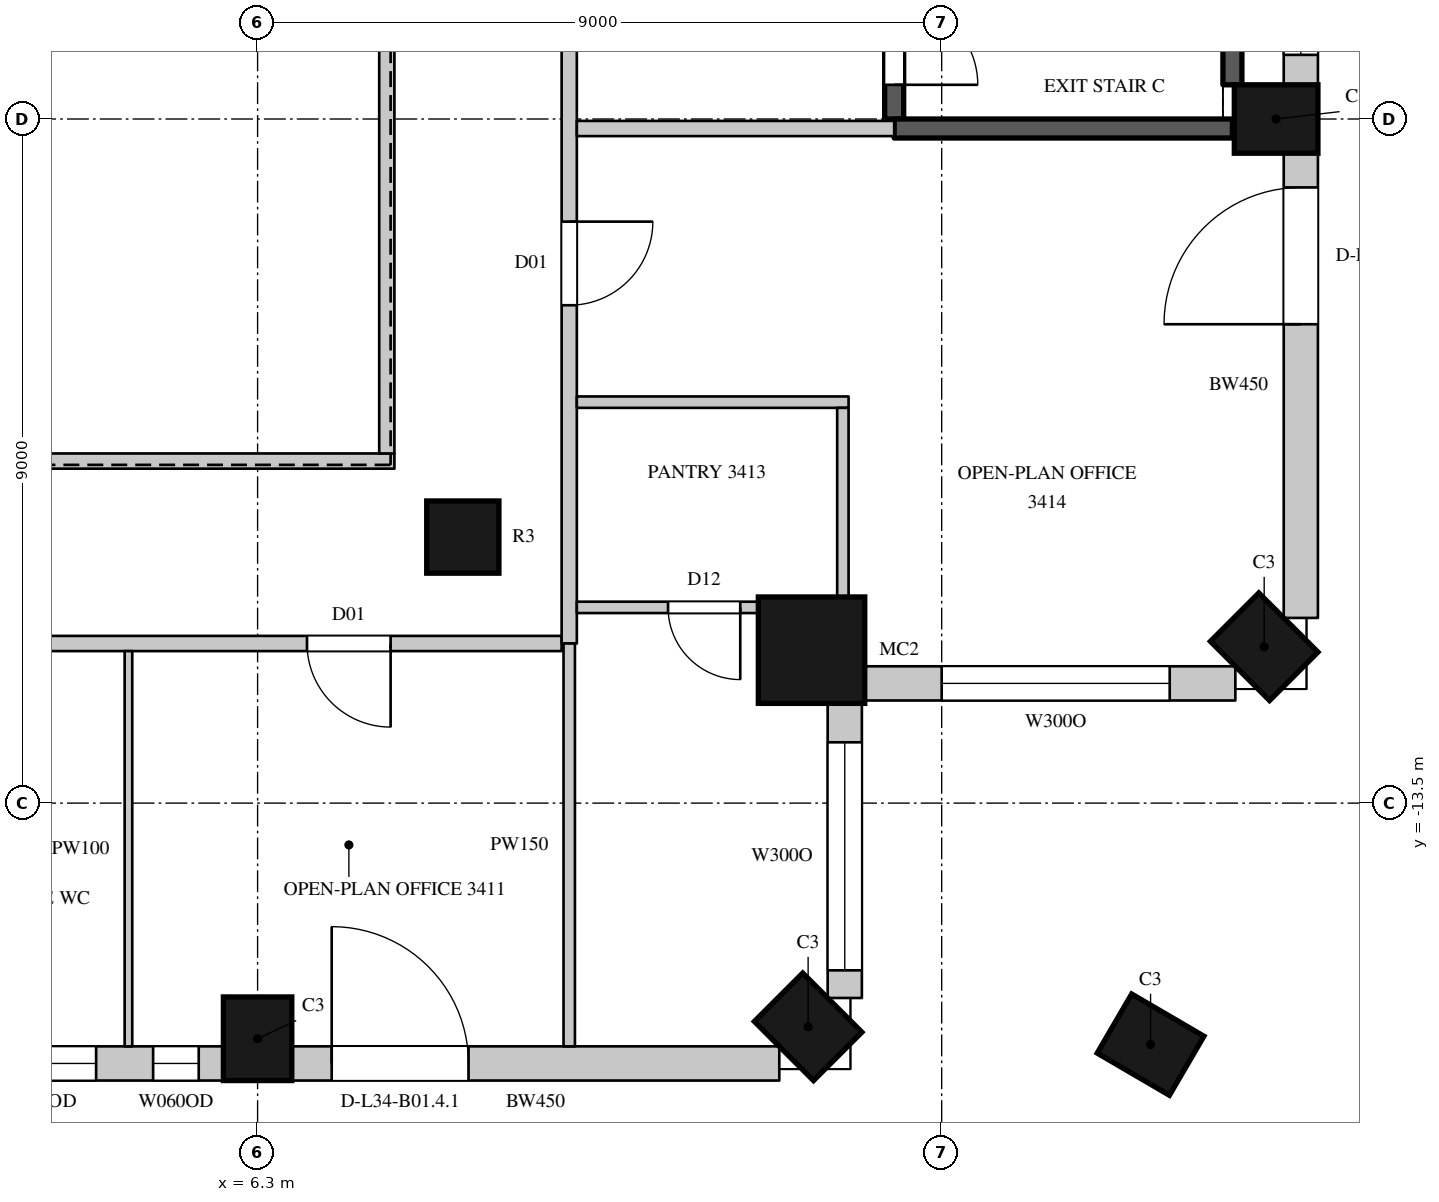
"""IFC4 building model, lengths in metres.
Left out: names, types, materials, properties, quantities, classifications, styles, units other than length and angle.
Written with IfcOpenShell. Run it as: python <this file> out.ifc"""

import sys

from ifc_helpers import new_model, si_unit, direction, frame, frame_2d, origin, origin_2d, place, context, subcontext, project, spatial, rectangle, circle, extrude, element, fill, save


model = new_model("IFC4")
c1 = context("Model", 3, precision=1e-05, world=origin(), true_north=direction((0.0, 1.0)))
c2 = subcontext(c1, "Body", "Model", "MODEL_VIEW")
j1 = project(units=[si_unit("LENGTHUNIT", "METRE"), si_unit("PLANEANGLEUNIT", "RADIAN")], contexts=[c1])
p1 = place(None, origin())
s1 = spatial("IfcSite", under=j1, at=p1, CompositionType="ELEMENT")
p2 = place(p1, origin())
s2 = spatial("IfcBuilding", under=s1, at=p2, CompositionType="ELEMENT")
p3 = place(p2, frame((0.0, 0.0, 160.5)))
s3 = spatial("IfcBuildingStorey", under=s2, at=p3, CompositionType="ELEMENT", Elevation=160.5)
for number, where, z_axis, x_axis in (
    (1, (6.3, -16.6, 0.0), (0.0, 0.0, 1.0), (1.0, 0.0, 0.0)),
    (2, (13.543, -16.443, 0.0), (0.0, 0.0, 1.0), (0.707, 0.707, 0.0)),
):
    element("IfcColumn", number, at=place(p3, frame(where, z_axis=z_axis, x_axis=x_axis)), inside=s3, PredefinedType="COLUMN", context=c2, shape_type="SweptSolid", body=[
        extrude(rectangle(XDim=0.9, YDim=1.1, at=origin_2d()), origin(), (0.0, 0.0, 1.0), 4.1),
    ])
p4 = place(p3, frame((13.588, -11.488, 0.0), z_axis=(0.0, 0.0, 1.0), x_axis=(1.0, 0.0, 0.0)))
e3 = element("IfcColumn", 3, at=p4, inside=s3, PredefinedType="COLUMN", context=c2, shape_type="SweptSolid", body=[
    extrude(circle(Radius=0.7, at=origin_2d()), origin(), (0.0, 0.0, 1.0), 4.1),
])
for number, where, z_axis, x_axis in (
    (4, (19.543, -11.443, 0.0), (0.0, 0.0, 1.0), (0.707, 0.707, 0.0)),
    (5, (19.7, -4.5, 0.0), (0.0, 0.0, 1.0), (0.0, 1.0, 0.0)),
    (6, (18.048, -16.677, 0.0), (0.0, 0.0, 1.0), (0.504, 0.863, 0.0)),
):
    element("IfcColumn", number, at=place(p3, frame(where, z_axis=z_axis, x_axis=x_axis)), inside=s3, PredefinedType="COLUMN", context=c2, shape_type="SweptSolid", body=[
        extrude(rectangle(XDim=0.9, YDim=1.1, at=origin_2d()), origin(), (0.0, 0.0, 1.0), 4.1),
    ])
p5 = place(p3, frame((9.0, -10.0, 0.0), z_axis=(0.0, 0.0, 1.0), x_axis=(1.0, 0.0, 0.0)))
e7 = element("IfcColumn", 7, at=p5, inside=s3, PredefinedType="COLUMN", context=c2, shape_type="SweptSolid", body=[
    extrude(circle(Radius=0.475, at=origin_2d()), origin(), (0.0, 0.0, 1.0), 4.1),
])
p6 = place(p3, frame((-2.25, -16.925, 0.0), z_axis=(0.0, 0.0, 1.0), x_axis=(1.0, 0.0, 0.0)))
e8 = element("IfcWall", 8, at=p6, inside=s3, PredefinedType="SOLIDWALL", context=c2, shape_type="SweptSolid", body=[
    extrude(rectangle(XDim=8.1, YDim=0.45, at=frame_2d((4.05, 0.0))), origin(), (0.0, 0.0, 1.0), 3.8),
])
p7 = place(p6, frame((0.2, 0.0, 0.0)))
e9 = element("IfcOpeningElement", 9, at=p7, cuts=e8, PredefinedType="OPENING", context=c2, shape_type="SweptSolid", body=[
    extrude(rectangle(XDim=1.8, YDim=2.4, at=frame_2d((0.9, 1.2))), frame((0.0, 0.235, 0.0), z_axis=(0.0, -1.0, 0.0), x_axis=(1.0, 0.0, 0.0)), (0.0, 0.0, 1.0), 0.47),
])
p8 = place(p6, frame((2.2, 0.0, 1.05)))
e10 = element("IfcOpeningElement", 10, at=p8, cuts=e8, PredefinedType="OPENING", context=c2, shape_type="SweptSolid", body=[
    extrude(rectangle(XDim=1.2, YDim=2.4, at=frame_2d((0.6, 1.2))), frame((0.0, 0.235, 0.0), z_axis=(0.0, -1.0, 0.0), x_axis=(1.0, 0.0, 0.0)), (0.0, 0.0, 1.0), 0.47),
])
p9 = place(p6, frame((4.926, 0.0, 1.05)))
e11 = element("IfcOpeningElement", 11, at=p9, cuts=e8, PredefinedType="OPENING", context=c2, shape_type="SweptSolid", body=[
    extrude(rectangle(XDim=1.5, YDim=2.4, at=frame_2d((0.75, 1.2))), frame((0.0, 0.235, 0.0), z_axis=(0.0, -1.0, 0.0), x_axis=(1.0, 0.0, 0.0)), (0.0, 0.0, 1.0), 0.47),
])
p10 = place(p6, frame((7.176, 0.0, 1.05)))
e12 = element("IfcOpeningElement", 12, at=p10, cuts=e8, PredefinedType="OPENING", context=c2, shape_type="SweptSolid", body=[
    extrude(rectangle(XDim=0.6, YDim=2.4, at=frame_2d((0.3, 1.2))), frame((0.0, 0.235, 0.0), z_axis=(0.0, -1.0, 0.0), x_axis=(1.0, 0.0, 0.0)), (0.0, 0.0, 1.0), 0.47),
])
p11 = place(p3, frame((6.75, -16.925, 0.0), z_axis=(0.0, 0.0, 1.0), x_axis=(1.0, 0.0, 0.0)))
e13 = element("IfcWall", 13, at=p11, inside=s3, PredefinedType="SOLIDWALL", context=c2, shape_type="SweptSolid", body=[
    extrude(rectangle(XDim=6.414, YDim=0.45, at=frame_2d((3.207, 0.0))), origin(), (0.0, 0.0, 1.0), 3.8),
])
p12 = place(p11, frame((0.525, 0.0, 0.0)))
e14 = element("IfcOpeningElement", 14, at=p12, cuts=e13, PredefinedType="OPENING", context=c2, shape_type="SweptSolid", body=[
    extrude(rectangle(XDim=1.8, YDim=2.4, at=frame_2d((0.9, 1.2))), frame((0.0, 0.235, 0.0), z_axis=(0.0, -1.0, 0.0), x_axis=(1.0, 0.0, 0.0)), (0.0, 0.0, 1.0), 0.47),
])
p13 = place(p3, frame((14.025, -16.064, 0.0), z_axis=(0.0, 0.0, 1.0), x_axis=(0.0, 1.0, 0.0)))
e15 = element("IfcWall", 15, at=p13, inside=s3, PredefinedType="SOLIDWALL", context=c2, shape_type="SweptSolid", body=[
    extrude(rectangle(XDim=3.909, YDim=0.45, at=frame_2d((1.955, 0.0))), origin(), (0.0, 0.0, 1.0), 3.8),
])
p14 = place(p13, frame((0.364, 0.0, 1.05)))
e16 = element("IfcOpeningElement", 16, at=p14, cuts=e15, PredefinedType="OPENING", context=c2, shape_type="SweptSolid", body=[
    extrude(rectangle(XDim=3.0, YDim=2.4, at=frame_2d((1.5, 1.2))), frame((0.0, 0.235, 0.0), z_axis=(0.0, -1.0, 0.0), x_axis=(1.0, 0.0, 0.0)), (0.0, 0.0, 1.0), 0.47),
])
p15 = place(p3, frame((14.255, -11.925, 0.0), z_axis=(0.0, 0.0, 1.0), x_axis=(1.0, 0.0, 0.0)))
e17 = element("IfcWall", 17, at=p15, inside=s3, PredefinedType="SOLIDWALL", context=c2, shape_type="SweptSolid", body=[
    extrude(rectangle(XDim=4.909, YDim=0.45, at=frame_2d((2.455, 0.0))), origin(), (0.0, 0.0, 1.0), 3.8),
])
p16 = place(p15, frame((1.045, 0.0, 1.05)))
e18 = element("IfcOpeningElement", 18, at=p16, cuts=e17, PredefinedType="OPENING", context=c2, shape_type="SweptSolid", body=[
    extrude(rectangle(XDim=3.0, YDim=2.4, at=frame_2d((1.5, 1.2))), frame((0.0, 0.235, 0.0), z_axis=(0.0, -1.0, 0.0), x_axis=(1.0, 0.0, 0.0)), (0.0, 0.0, 1.0), 0.47),
])
p17 = place(p3, frame((20.025, -11.064, 0.0), z_axis=(0.0, 0.0, 1.0), x_axis=(0.0, 1.0, 0.0)))
e19 = element("IfcWall", 19, at=p17, inside=s3, PredefinedType="SOLIDWALL", context=c2, shape_type="SweptSolid", body=[
    extrude(rectangle(XDim=6.114, YDim=0.45, at=frame_2d((3.057, 0.0))), origin(), (0.0, 0.0, 1.0), 3.8),
])
p18 = place(p17, frame((3.864, 0.0, 0.0)))
e20 = element("IfcOpeningElement", 20, at=p18, cuts=e19, PredefinedType="OPENING", context=c2, shape_type="SweptSolid", body=[
    extrude(rectangle(XDim=1.8, YDim=2.4, at=frame_2d((0.9, 1.2))), frame((0.0, 0.235, 0.0), z_axis=(0.0, -1.0, 0.0), x_axis=(1.0, 0.0, 0.0)), (0.0, 0.0, 1.0), 0.47),
])
p19 = place(p3, frame((20.025, -4.05, 0.0), z_axis=(0.0, 0.0, 1.0), x_axis=(0.0, 1.0, 0.0)))
e21 = element("IfcWall", 21, at=p19, inside=s3, PredefinedType="SOLIDWALL", context=c2, shape_type="SweptSolid", body=[
    extrude(rectangle(XDim=8.439, YDim=0.45, at=frame_2d((4.219, 0.0))), origin(), (0.0, 0.0, 1.0), 3.8),
])
p20 = place(p19, frame((0.394, 0.0, 1.05)))
e22 = element("IfcOpeningElement", 22, at=p20, cuts=e21, PredefinedType="OPENING", context=c2, shape_type="SweptSolid", body=[
    extrude(rectangle(XDim=3.0, YDim=2.4, at=frame_2d((1.5, 1.2))), frame((0.0, 0.235, 0.0), z_axis=(0.0, -1.0, 0.0), x_axis=(1.0, 0.0, 0.0)), (0.0, 0.0, 1.0), 0.47),
])
p21 = place(p19, frame((5.082, 0.0, 1.05)))
e23 = element("IfcOpeningElement", 23, at=p21, cuts=e21, PredefinedType="OPENING", context=c2, shape_type="SweptSolid", body=[
    extrude(rectangle(XDim=3.0, YDim=2.4, at=frame_2d((1.5, 1.2))), frame((0.0, 0.235, 0.0), z_axis=(0.0, -1.0, 0.0), x_axis=(1.0, 0.0, 0.0)), (0.0, 0.0, 1.0), 0.47),
])
p22 = place(p3, frame((-10.9, -11.4, 0.0), z_axis=(0.0, 0.0, 1.0), x_axis=(1.0, 0.0, 0.0)))
e24 = element("IfcWall", 24, at=p22, inside=s3, PredefinedType="PARTITIONING", context=c2, shape_type="SweptSolid", body=[
    extrude(rectangle(XDim=21.2, YDim=0.2, at=frame_2d((10.6, 0.0))), origin(), (0.0, 0.0, 1.0), 3.8),
])
p23 = place(p22, frame((0.95, 0.0, 0.0)))
e25 = element("IfcOpeningElement", 25, at=p23, cuts=e24, PredefinedType="OPENING", context=c2, shape_type="SweptSolid", body=[
    extrude(rectangle(XDim=0.95, YDim=2.2, at=frame_2d((0.475, 1.1))), frame((0.0, 0.11, 0.0), z_axis=(0.0, -1.0, 0.0), x_axis=(1.0, 0.0, 0.0)), (0.0, 0.0, 1.0), 0.22),
])
p24 = place(p22, frame((4.2, 0.0, 0.0)))
e26 = element("IfcOpeningElement", 26, at=p24, cuts=e24, PredefinedType="OPENING", context=c2, shape_type="SweptSolid", body=[
    extrude(rectangle(XDim=0.95, YDim=2.2, at=frame_2d((0.475, 1.1))), frame((0.0, 0.11, 0.0), z_axis=(0.0, -1.0, 0.0), x_axis=(1.0, 0.0, 0.0)), (0.0, 0.0, 1.0), 0.22),
])
p25 = place(p22, frame((7.1, 0.0, 0.0)))
e27 = element("IfcOpeningElement", 27, at=p25, cuts=e24, PredefinedType="OPENING", context=c2, shape_type="SweptSolid", body=[
    extrude(rectangle(XDim=0.9, YDim=2.2, at=frame_2d((0.45, 1.1))), frame((0.0, 0.11, 0.0), z_axis=(0.0, -1.0, 0.0), x_axis=(1.0, 0.0, 0.0)), (0.0, 0.0, 1.0), 0.22),
])
p26 = place(p22, frame((10.0, 0.0, 0.0)))
e28 = element("IfcOpeningElement", 28, at=p26, cuts=e24, PredefinedType="OPENING", context=c2, shape_type="SweptSolid", body=[
    extrude(rectangle(XDim=0.9, YDim=2.2, at=frame_2d((0.45, 1.1))), frame((0.0, 0.11, 0.0), z_axis=(0.0, -1.0, 0.0), x_axis=(1.0, 0.0, 0.0)), (0.0, 0.0, 1.0), 0.22),
])
p27 = place(p22, frame((13.55, 0.0, 0.0)))
e29 = element("IfcOpeningElement", 29, at=p27, cuts=e24, PredefinedType="OPENING", context=c2, shape_type="SweptSolid", body=[
    extrude(rectangle(XDim=0.9, YDim=2.2, at=frame_2d((0.45, 1.1))), frame((0.0, 0.11, 0.0), z_axis=(0.0, -1.0, 0.0), x_axis=(1.0, 0.0, 0.0)), (0.0, 0.0, 1.0), 0.22),
])
p28 = place(p22, frame((17.85, 0.0, 0.0)))
e30 = element("IfcOpeningElement", 30, at=p28, cuts=e24, PredefinedType="OPENING", context=c2, shape_type="SweptSolid", body=[
    extrude(rectangle(XDim=1.1, YDim=2.4, at=frame_2d((0.55, 1.2))), frame((0.0, 0.11, 0.0), z_axis=(0.0, -1.0, 0.0), x_axis=(1.0, 0.0, 0.0)), (0.0, 0.0, 1.0), 0.22),
])
p29 = place(p3, frame((-6.1, -9.0, 0.0), z_axis=(0.0, 0.0, 1.0), x_axis=(1.0, 0.0, 0.0)))
e31 = element("IfcWall", 31, at=p29, inside=s3, PredefinedType="PARTITIONING", context=c2, shape_type="SweptSolid", body=[
    extrude(rectangle(XDim=14.2, YDim=0.2, at=frame_2d((7.1, 0.0))), origin(), (0.0, 0.0, 1.0), 3.8),
])
p30 = place(p3, frame((8.0, -8.9, 0.0), z_axis=(0.0, 0.0, 1.0), x_axis=(0.0, 1.0, 0.0)))
e32 = element("IfcWall", 32, at=p30, inside=s3, PredefinedType="PARTITIONING", context=c2, shape_type="SweptSolid", body=[
    extrude(rectangle(XDim=7.08, YDim=0.2, at=frame_2d((3.54, 0.0))), origin(), (0.0, 0.0, 1.0), 3.8),
])
p31 = place(p3, frame((10.4, -11.4, 0.0), z_axis=(0.0, 0.0, 1.0), x_axis=(0.0, 1.0, 0.0)))
e33 = element("IfcWall", 33, at=p31, inside=s3, PredefinedType="PARTITIONING", context=c2, shape_type="SweptSolid", body=[
    extrude(rectangle(XDim=23.5, YDim=0.2, at=frame_2d((11.75, 0.0))), origin(), (0.0, 0.0, 1.0), 3.8),
])
p32 = place(p31, frame((12.1, 0.0, 0.0)))
e34 = element("IfcOpeningElement", 34, at=p32, cuts=e33, PredefinedType="OPENING", context=c2, shape_type="SweptSolid", body=[
    extrude(rectangle(XDim=1.5, YDim=2.4, at=frame_2d((0.75, 1.2))), frame((0.0, 0.11, 0.0), z_axis=(0.0, -1.0, 0.0), x_axis=(1.0, 0.0, 0.0)), (0.0, 0.0, 1.0), 0.22),
])
p33 = place(p31, frame((19.25, 0.0, 0.0)))
e35 = element("IfcOpeningElement", 35, at=p33, cuts=e33, PredefinedType="OPENING", context=c2, shape_type="SweptSolid", body=[
    extrude(rectangle(XDim=1.1, YDim=2.4, at=frame_2d((0.55, 1.2))), frame((0.0, 0.11, 0.0), z_axis=(0.0, -1.0, 0.0), x_axis=(1.0, 0.0, 0.0)), (0.0, 0.0, 1.0), 0.22),
])
p34 = place(p31, frame((4.45, 0.0, 0.0)))
e36 = element("IfcOpeningElement", 36, at=p34, cuts=e33, PredefinedType="OPENING", context=c2, shape_type="SweptSolid", body=[
    extrude(rectangle(XDim=1.1, YDim=2.4, at=frame_2d((0.55, 1.2))), frame((0.0, 0.11, 0.0), z_axis=(0.0, -1.0, 0.0), x_axis=(1.0, 0.0, 0.0)), (0.0, 0.0, 1.0), 0.22),
])
p35 = place(p3, frame((10.5, -4.625, 0.0), z_axis=(0.0, 0.0, 1.0), x_axis=(1.0, 0.0, 0.0)))
e37 = element("IfcWall", 37, at=p35, inside=s3, PredefinedType="PARTITIONING", context=c2, shape_type="SweptSolid", body=[
    extrude(rectangle(XDim=4.175, YDim=0.2, at=frame_2d((2.087, 0.0))), origin(), (0.0, 0.0, 1.0), 3.8),
])
p36 = place(p3, frame((10.4, -16.7, 0.0), z_axis=(0.0, 0.0, 1.0), x_axis=(0.0, 1.0, 0.0)))
e38 = element("IfcWall", 38, at=p36, inside=s3, PredefinedType="PARTITIONING", context=c2, shape_type="SweptSolid", body=[
    extrude(rectangle(XDim=5.3, YDim=0.15, at=frame_2d((2.65, 0.0))), origin(), (0.0, 0.0, 1.0), 3.8),
])
p37 = place(p3, frame((10.5, -10.925, 0.0), z_axis=(0.0, 0.0, 1.0), x_axis=(1.0, 0.0, 0.0)))
e39 = element("IfcWall", 39, at=p37, inside=s3, PredefinedType="PARTITIONING", context=c2, shape_type="SweptSolid", body=[
    extrude(rectangle(XDim=2.606, YDim=0.15, at=frame_2d((1.303, 0.0))), origin(), (0.0, 0.0, 1.0), 3.8),
])
p38 = place(p37, frame((1.2, 0.0, 0.0)))
e40 = element("IfcOpeningElement", 40, at=p38, cuts=e39, PredefinedType="OPENING", context=c2, shape_type="SweptSolid", body=[
    extrude(rectangle(XDim=0.95, YDim=2.2, at=frame_2d((0.475, 1.1))), frame((0.0, 0.085, 0.0), z_axis=(0.0, -1.0, 0.0), x_axis=(1.0, 0.0, 0.0)), (0.0, 0.0, 1.0), 0.17),
])
p39 = place(p3, frame((10.5, -8.225, 0.0), z_axis=(0.0, 0.0, 1.0), x_axis=(1.0, 0.0, 0.0)))
e41 = element("IfcWall", 41, at=p39, inside=s3, PredefinedType="PARTITIONING", context=c2, shape_type="SweptSolid", body=[
    extrude(rectangle(XDim=3.575, YDim=0.15, at=frame_2d((1.788, 0.0))), origin(), (0.0, 0.0, 1.0), 3.15),
])
p40 = place(p3, frame((14.0, -10.85, 0.0), z_axis=(0.0, 0.0, 1.0), x_axis=(0.0, 1.0, 0.0)))
e42 = element("IfcWall", 42, at=p40, inside=s3, PredefinedType="PARTITIONING", context=c2, shape_type="SweptSolid", body=[
    extrude(rectangle(XDim=2.55, YDim=0.15, at=frame_2d((1.275, 0.0))), origin(), (0.0, 0.0, 1.0), 3.8),
])
p41 = place(p3, frame((14.675, -4.5, 0.0), z_axis=(0.0, 0.0, 1.0), x_axis=(0.0, 1.0, 0.0)))
e43 = element("IfcWall", 43, at=p41, inside=s3, PredefinedType="SHEAR", context=c2, shape_type="SweptSolid", body=[
    extrude(rectangle(XDim=9.0, YDim=0.25, at=frame_2d((4.5, 0.0))), origin(), (0.0, 0.0, 1.0), 3.8),
])
p42 = place(p41, frame((0.45, 0.0, 0.0)))
e44 = element("IfcOpeningElement", 44, at=p42, cuts=e43, PredefinedType="OPENING", context=c2, shape_type="SweptSolid", body=[
    extrude(rectangle(XDim=1.1, YDim=2.2, at=frame_2d((0.55, 1.1))), frame((0.0, 0.135, 0.0), z_axis=(0.0, -1.0, 0.0), x_axis=(1.0, 0.0, 0.0)), (0.0, 0.0, 1.0), 0.27),
])
p43 = place(p3, frame((14.675, -4.625, 0.0), z_axis=(0.0, 0.0, 1.0), x_axis=(1.0, 0.0, 0.0)))
e45 = element("IfcWall", 45, at=p43, inside=s3, PredefinedType="SHEAR", context=c2, shape_type="SweptSolid", body=[
    extrude(rectangle(XDim=4.45, YDim=0.25, at=frame_2d((2.225, 0.0))), origin(), (0.0, 0.0, 1.0), 3.8),
])
p44 = place(p3, frame((19.125, -4.05, 0.0), z_axis=(0.0, 0.0, 1.0), x_axis=(0.0, 1.0, 0.0)))
e46 = element("IfcWall", 46, at=p44, inside=s3, PredefinedType="SHEAR", context=c2, shape_type="SweptSolid", body=[
    extrude(rectangle(XDim=8.477, YDim=0.25, at=frame_2d((4.238, 0.0))), origin(), (0.0, 0.0, 1.0), 3.8),
])
p45 = place(p3, frame((4.601, -16.7, 0.0), z_axis=(0.0, 0.0, 1.0), x_axis=(0.0, 1.0, 0.0)))
e47 = element("IfcWall", 47, at=p45, inside=s3, PredefinedType="PARTITIONING", context=c2, shape_type="SweptSolid", body=[
    extrude(rectangle(XDim=5.2, YDim=0.1, at=frame_2d((2.6, 0.0))), origin(), (0.0, 0.0, 1.0), 3.8),
])
p46 = place(p12, origin())
e48 = element("IfcDoor", 48, at=p46, inside=s3, OperationType="SLIDING_TO_LEFT", PredefinedType="DOOR", context=c2, shape_type="SweptSolid", body=[
    extrude(rectangle(XDim=1.8, YDim=2.4, at=frame_2d((0.9, 1.2))), frame((0.0, 0.13, 0.0), z_axis=(0.0, -1.0, 0.0), x_axis=(1.0, 0.0, 0.0)), (0.0, 0.0, 1.0), 0.05),
])
fill(e14, e48)
p47 = place(p14, origin())
e49 = element("IfcWindow", 49, at=p47, inside=s3, PartitioningType="SINGLE_PANEL", PredefinedType="WINDOW", context=c2, shape_type="SweptSolid", body=[
    extrude(rectangle(XDim=3.0, YDim=2.4, at=frame_2d((1.5, 1.2))), frame((0.0, 0.135, 0.0), z_axis=(0.0, -1.0, 0.0), x_axis=(1.0, 0.0, 0.0)), (0.0, 0.0, 1.0), 0.06),
])
fill(e16, e49)
p48 = place(p16, origin())
e50 = element("IfcWindow", 50, at=p48, inside=s3, PartitioningType="SINGLE_PANEL", PredefinedType="WINDOW", context=c2, shape_type="SweptSolid", body=[
    extrude(rectangle(XDim=3.0, YDim=2.4, at=frame_2d((1.5, 1.2))), frame((0.0, 0.135, 0.0), z_axis=(0.0, -1.0, 0.0), x_axis=(1.0, 0.0, 0.0)), (0.0, 0.0, 1.0), 0.06),
])
fill(e18, e50)
p49 = place(p18, origin())
e51 = element("IfcDoor", 51, at=p49, inside=s3, OperationType="SLIDING_TO_LEFT", PredefinedType="DOOR", context=c2, shape_type="SweptSolid", body=[
    extrude(rectangle(XDim=1.8, YDim=2.4, at=frame_2d((0.9, 1.2))), frame((0.0, 0.13, 0.0), z_axis=(0.0, -1.0, 0.0), x_axis=(1.0, 0.0, 0.0)), (0.0, 0.0, 1.0), 0.05),
])
fill(e20, e51)
p50 = place(p20, origin())
e52 = element("IfcWindow", 52, at=p50, inside=s3, PartitioningType="SINGLE_PANEL", PredefinedType="WINDOW", context=c2, shape_type="SweptSolid", body=[
    extrude(rectangle(XDim=3.0, YDim=2.4, at=frame_2d((1.5, 1.2))), frame((0.0, 0.135, 0.0), z_axis=(0.0, -1.0, 0.0), x_axis=(1.0, 0.0, 0.0)), (0.0, 0.0, 1.0), 0.06),
])
fill(e22, e52)
p51 = place(p28, origin())
e53 = element("IfcDoor", 53, at=p51, inside=s3, OperationType="SINGLE_SWING_LEFT", PredefinedType="DOOR", context=c2, shape_type="SweptSolid", body=[
    extrude(rectangle(XDim=1.1, YDim=2.4, at=frame_2d((0.55, 1.2))), frame((0.0, 0.025, 0.0), z_axis=(0.0, -1.0, 0.0), x_axis=(1.0, 0.0, 0.0)), (0.0, 0.0, 1.0), 0.05),
])
fill(e30, e53)
p52 = place(p34, origin())
e54 = element("IfcDoor", 54, at=p52, inside=s3, OperationType="SINGLE_SWING_LEFT", PredefinedType="DOOR", context=c2, shape_type="SweptSolid", body=[
    extrude(rectangle(XDim=1.1, YDim=2.4, at=frame_2d((0.55, 1.2))), frame((0.0, 0.025, 0.0), z_axis=(0.0, -1.0, 0.0), x_axis=(1.0, 0.0, 0.0)), (0.0, 0.0, 1.0), 0.05),
])
fill(e36, e54)
p53 = place(p38, origin())
e55 = element("IfcDoor", 55, at=p53, inside=s3, OperationType="SINGLE_SWING_LEFT", PredefinedType="DOOR", context=c2, shape_type="SweptSolid", body=[
    extrude(rectangle(XDim=0.95, YDim=2.2, at=frame_2d((0.475, 1.1))), frame((0.0, 0.025, 0.0), z_axis=(0.0, -1.0, 0.0), x_axis=(1.0, 0.0, 0.0)), (0.0, 0.0, 1.0), 0.05),
])
fill(e40, e55)
p54 = place(p42, origin())
e56 = element("IfcDoor", 56, at=p54, inside=s3, OperationType="SINGLE_SWING_RIGHT", PredefinedType="DOOR", context=c2, shape_type="SweptSolid", body=[
    extrude(rectangle(XDim=1.1, YDim=2.2, at=frame_2d((0.55, 1.1))), frame((0.0, 0.025, 0.0), z_axis=(0.0, -1.0, 0.0), x_axis=(1.0, 0.0, 0.0)), (0.0, 0.0, 1.0), 0.05),
])
fill(e44, e56)
p55 = place(p9, origin())
e57 = element("IfcWindow", 57, at=p55, inside=s3, PartitioningType="SINGLE_PANEL", PredefinedType="WINDOW", context=c2, shape_type="SweptSolid", body=[
    extrude(rectangle(XDim=1.5, YDim=2.4, at=frame_2d((0.75, 1.2))), frame((0.0, 0.135, 0.0), z_axis=(0.0, -1.0, 0.0), x_axis=(1.0, 0.0, 0.0)), (0.0, 0.0, 1.0), 0.06),
])
fill(e11, e57)
p56 = place(p10, origin())
e58 = element("IfcWindow", 58, at=p56, inside=s3, PartitioningType="SINGLE_PANEL", PredefinedType="WINDOW", context=c2, shape_type="SweptSolid", body=[
    extrude(rectangle(XDim=0.6, YDim=2.4, at=frame_2d((0.3, 1.2))), frame((0.0, 0.135, 0.0), z_axis=(0.0, -1.0, 0.0), x_axis=(1.0, 0.0, 0.0)), (0.0, 0.0, 1.0), 0.06),
])
fill(e12, e58)
save(model, sys.argv[1])
